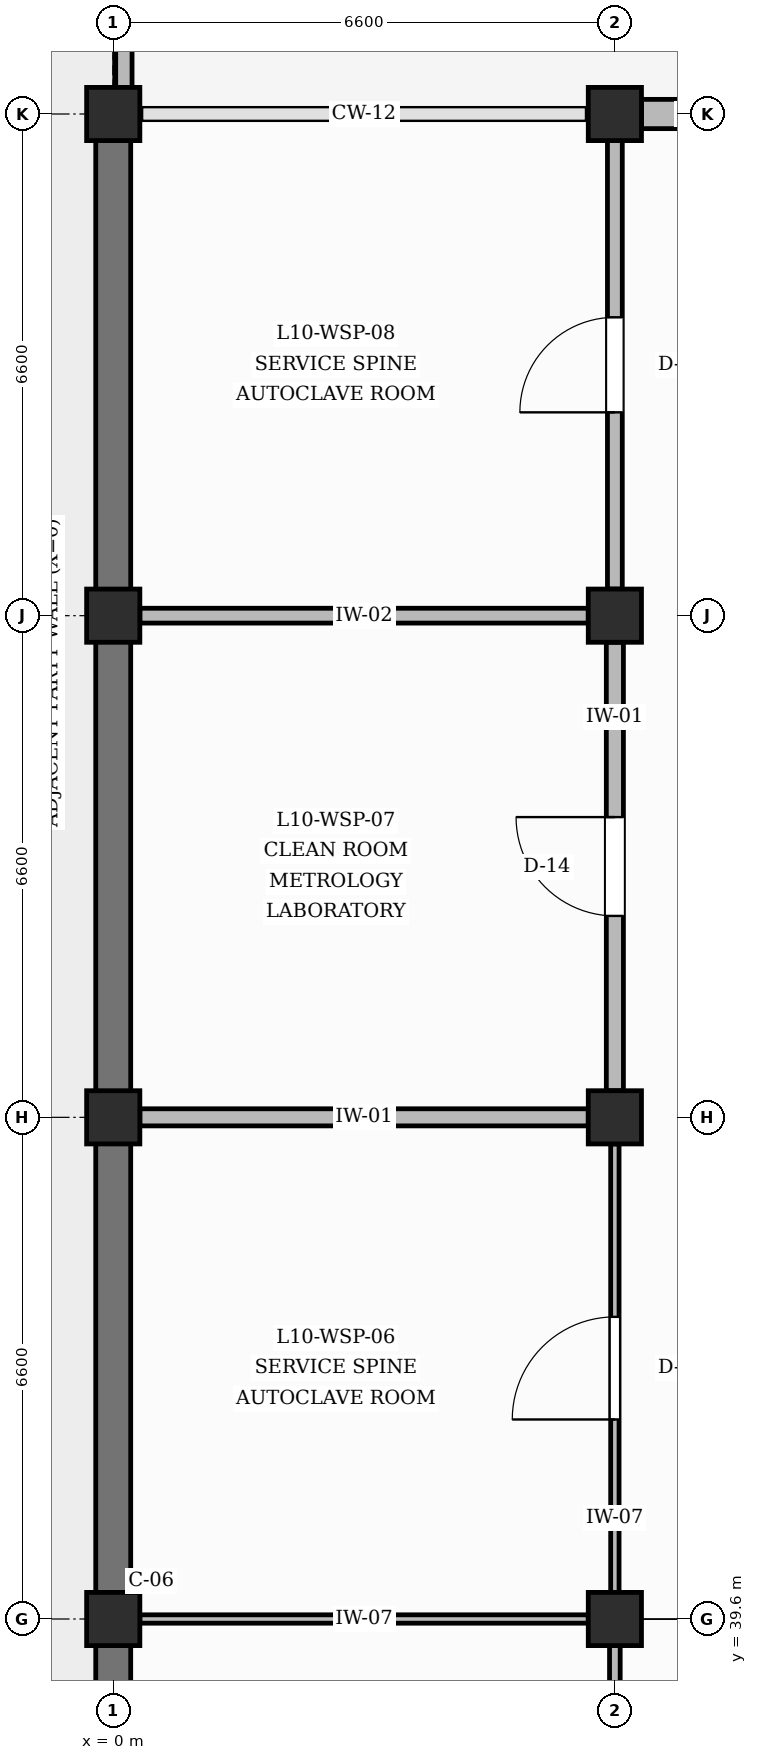
"""IFC4 building model, lengths in metres.
Left out: names, types, materials, properties, quantities, classifications, styles, units other than length and angle.
Written with IfcOpenShell. Run it as: python <this file> out.ifc"""

import sys

from ifc_helpers import new_model, si_unit, direction, frame, frame_2d, origin, origin_2d, place, context, subcontext, project, spatial, rectangle, extrude, element, fill, save


model = new_model("IFC4")
c1 = context("Model", 3, precision=1e-05, world=origin(), true_north=direction((0.0, 1.0)))
c2 = subcontext(c1, "Body", "Model", "MODEL_VIEW")
j1 = project(units=[si_unit("LENGTHUNIT", "METRE"), si_unit("PLANEANGLEUNIT", "RADIAN")], contexts=[c1])
p1 = place(None, origin())
s1 = spatial("IfcSite", under=j1, at=p1, CompositionType="ELEMENT")
p2 = place(p1, origin())
s2 = spatial("IfcBuilding", under=s1, at=p2, CompositionType="ELEMENT")
p3 = place(p2, frame((0.0, 0.0, 43.8)))
s3 = spatial("IfcBuildingStorey", under=s2, at=p3, CompositionType="ELEMENT", Elevation=43.8)
for number, where, z_axis, x_axis in (
    (1, (0.0, 39.6, 0.0), (0.0, 0.0, 1.0), (1.0, 0.0, 0.0)),
    (2, (0.0, 46.2, 0.0), (0.0, 0.0, 1.0), (1.0, 0.0, 0.0)),
    (3, (0.0, 52.8, 0.0), (0.0, 0.0, 1.0), (1.0, 0.0, 0.0)),
    (4, (0.0, 59.4, 0.0), (0.0, 0.0, 1.0), (1.0, 0.0, 0.0)),
    (5, (6.6, 39.6, 0.0), (0.0, 0.0, 1.0), (1.0, 0.0, 0.0)),
    (6, (6.6, 46.2, 0.0), (0.0, 0.0, 1.0), (1.0, 0.0, 0.0)),
    (7, (6.6, 52.8, 0.0), (0.0, 0.0, 1.0), (1.0, 0.0, 0.0)),
    (8, (6.6, 59.4, 0.0), (0.0, 0.0, 1.0), (1.0, 0.0, 0.0)),
):
    element("IfcColumn", number, at=place(p3, frame(where, z_axis=z_axis, x_axis=x_axis)), inside=s3, PredefinedType="COLUMN", context=c2, shape_type="SweptSolid", body=[
        extrude(rectangle(XDim=0.7, YDim=0.7, at=origin_2d()), origin(), (0.0, 0.0, 1.0), 4.2),
    ])
p4 = place(p3, frame((0.0, 33.35, 0.0), z_axis=(0.0, 0.0, 1.0), x_axis=(0.0, 1.0, 0.0)))
e9 = element("IfcWall", 9, at=p4, inside=s3, PredefinedType="SOLIDWALL", context=c2, shape_type="SweptSolid", body=[
    extrude(rectangle(XDim=5.9, YDim=0.46, at=frame_2d((2.95, 0.0))), origin(), (0.0, 0.0, 1.0), 3.29),
])
p5 = place(p3, frame((0.0, 39.95, 0.0), z_axis=(0.0, 0.0, 1.0), x_axis=(0.0, 1.0, 0.0)))
e10 = element("IfcWall", 10, at=p5, inside=s3, PredefinedType="SOLIDWALL", context=c2, shape_type="SweptSolid", body=[
    extrude(rectangle(XDim=5.9, YDim=0.46, at=frame_2d((2.95, 0.0))), origin(), (0.0, 0.0, 1.0), 3.29),
])
p6 = place(p3, frame((0.0, 46.55, 0.0), z_axis=(0.0, 0.0, 1.0), x_axis=(0.0, 1.0, 0.0)))
e11 = element("IfcWall", 11, at=p6, inside=s3, PredefinedType="SOLIDWALL", context=c2, shape_type="SweptSolid", body=[
    extrude(rectangle(XDim=5.9, YDim=0.46, at=frame_2d((2.95, 0.0))), origin(), (0.0, 0.0, 1.0), 3.29),
])
p7 = place(p3, frame((0.0, 53.15, 0.0), z_axis=(0.0, 0.0, 1.0), x_axis=(0.0, 1.0, 0.0)))
e12 = element("IfcWall", 12, at=p7, inside=s3, PredefinedType="SOLIDWALL", context=c2, shape_type="SweptSolid", body=[
    extrude(rectangle(XDim=5.9, YDim=0.46, at=frame_2d((2.95, 0.0))), origin(), (0.0, 0.0, 1.0), 3.29),
])
p8 = place(p3, frame((6.95, 59.4, 0.0), z_axis=(0.0, 0.0, 1.0), x_axis=(1.0, 0.0, 0.0)))
e13 = element("IfcWall", 13, at=p8, inside=s3, PredefinedType="SOLIDWALL", context=c2, shape_type="SweptSolid", body=[
    extrude(rectangle(XDim=5.9, YDim=0.385, at=frame_2d((2.95, 0.0))), origin(), (0.0, 0.0, 1.0), 3.29),
])
p9 = place(p8, frame((2.19, 0.0, 0.95)))
e14 = element("IfcOpeningElement", 14, at=p9, cuts=e13, PredefinedType="OPENING", context=c2, shape_type="SweptSolid", body=[
    extrude(rectangle(XDim=1.52, YDim=1.96, at=frame_2d((0.76, 0.98))), frame((0.0, 0.202, 0.0), z_axis=(0.0, -1.0, 0.0), x_axis=(1.0, 0.0, 0.0)), (0.0, 0.0, 1.0), 0.405),
])
p10 = place(p3, frame((0.14, 59.7, 0.0), z_axis=(0.0, 0.0, 1.0), x_axis=(0.0, 1.0, 0.0)))
e15 = element("IfcWall", 15, at=p10, inside=s3, PredefinedType="PARAPET", context=c2, shape_type="SweptSolid", body=[
    extrude(rectangle(XDim=6.0, YDim=0.215, at=frame_2d((3.0, 0.0))), origin(), (0.0, 0.0, 1.0), 1.15),
])
p11 = place(p3, frame((6.6, 33.35, 0.0), z_axis=(0.0, 0.0, 1.0), x_axis=(0.0, 1.0, 0.0)))
e16 = element("IfcWall", 16, at=p11, inside=s3, PredefinedType="PARTITIONING", context=c2, shape_type="SweptSolid", body=[
    extrude(rectangle(XDim=5.9, YDim=0.14, at=frame_2d((2.95, 0.0))), origin(), (0.0, 0.0, 1.0), 3.29),
])
p12 = place(p11, frame((2.25, 0.0, 0.0)))
e17 = element("IfcOpeningElement", 17, at=p12, cuts=e16, PredefinedType="OPENING", context=c2, shape_type="SweptSolid", body=[
    extrude(rectangle(XDim=1.4, YDim=2.25, at=frame_2d((0.7, 1.125))), frame((0.0, 0.08, 0.0), z_axis=(0.0, -1.0, 0.0), x_axis=(1.0, 0.0, 0.0)), (0.0, 0.0, 1.0), 0.16),
])
p13 = place(p3, frame((0.35, 39.6, 0.0), z_axis=(0.0, 0.0, 1.0), x_axis=(1.0, 0.0, 0.0)))
e18 = element("IfcWall", 18, at=p13, inside=s3, PredefinedType="PARTITIONING", context=c2, shape_type="SweptSolid", body=[
    extrude(rectangle(XDim=5.9, YDim=0.11, at=frame_2d((2.95, 0.0))), origin(), (0.0, 0.0, 1.0), 3.29),
])
p14 = place(p3, frame((6.6, 39.95, 0.0), z_axis=(0.0, 0.0, 1.0), x_axis=(0.0, 1.0, 0.0)))
e19 = element("IfcWall", 19, at=p14, inside=s3, PredefinedType="PARTITIONING", context=c2, shape_type="SweptSolid", body=[
    extrude(rectangle(XDim=5.9, YDim=0.11, at=frame_2d((2.95, 0.0))), origin(), (0.0, 0.0, 1.0), 3.29),
])
p15 = place(p14, frame((2.275, 0.0, 0.0)))
e20 = element("IfcOpeningElement", 20, at=p15, cuts=e19, PredefinedType="OPENING", context=c2, shape_type="SweptSolid", body=[
    extrude(rectangle(XDim=1.35, YDim=2.3, at=frame_2d((0.675, 1.15))), frame((0.0, 0.065, 0.0), z_axis=(0.0, -1.0, 0.0), x_axis=(1.0, 0.0, 0.0)), (0.0, 0.0, 1.0), 0.13),
])
p16 = place(p3, frame((0.35, 46.2, 0.0), z_axis=(0.0, 0.0, 1.0), x_axis=(1.0, 0.0, 0.0)))
e21 = element("IfcWall", 21, at=p16, inside=s3, PredefinedType="PARTITIONING", context=c2, shape_type="SweptSolid", body=[
    extrude(rectangle(XDim=5.9, YDim=0.225, at=frame_2d((2.95, 0.0))), origin(), (0.0, 0.0, 1.0), 3.29),
])
p17 = place(p3, frame((6.6, 46.55, 0.0), z_axis=(0.0, 0.0, 1.0), x_axis=(0.0, 1.0, 0.0)))
e22 = element("IfcWall", 22, at=p17, inside=s3, PredefinedType="PARTITIONING", context=c2, shape_type="SweptSolid", body=[
    extrude(rectangle(XDim=5.9, YDim=0.225, at=frame_2d((2.95, 0.0))), origin(), (0.0, 0.0, 1.0), 3.29),
])
p18 = place(p17, frame((2.3, 0.0, 0.0)))
e23 = element("IfcOpeningElement", 23, at=p18, cuts=e22, PredefinedType="OPENING", context=c2, shape_type="SweptSolid", body=[
    extrude(rectangle(XDim=1.3, YDim=2.3, at=frame_2d((0.65, 1.15))), frame((0.0, 0.123, 0.0), z_axis=(0.0, -1.0, 0.0), x_axis=(1.0, 0.0, 0.0)), (0.0, 0.0, 1.0), 0.245),
])
p19 = place(p3, frame((0.35, 52.8, 0.0), z_axis=(0.0, 0.0, 1.0), x_axis=(1.0, 0.0, 0.0)))
e24 = element("IfcWall", 24, at=p19, inside=s3, PredefinedType="PARTITIONING", context=c2, shape_type="SweptSolid", body=[
    extrude(rectangle(XDim=5.9, YDim=0.195, at=frame_2d((2.95, 0.0))), origin(), (0.0, 0.0, 1.0), 3.29),
])
p20 = place(p3, frame((6.6, 53.15, 0.0), z_axis=(0.0, 0.0, 1.0), x_axis=(0.0, 1.0, 0.0)))
e25 = element("IfcWall", 25, at=p20, inside=s3, PredefinedType="PARTITIONING", context=c2, shape_type="SweptSolid", body=[
    extrude(rectangle(XDim=5.9, YDim=0.195, at=frame_2d((2.95, 0.0))), origin(), (0.0, 0.0, 1.0), 3.29),
])
p21 = place(p20, frame((2.325, 0.0, 0.0)))
e26 = element("IfcOpeningElement", 26, at=p21, cuts=e25, PredefinedType="OPENING", context=c2, shape_type="SweptSolid", body=[
    extrude(rectangle(XDim=1.25, YDim=2.25, at=frame_2d((0.625, 1.125))), frame((0.0, 0.107, 0.0), z_axis=(0.0, -1.0, 0.0), x_axis=(1.0, 0.0, 0.0)), (0.0, 0.0, 1.0), 0.215),
])
p22 = place(p15, origin())
e27 = element("IfcDoor", 27, at=p22, inside=s3, OperationType="SINGLE_SWING_LEFT", PredefinedType="DOOR", context=c2, shape_type="SweptSolid", body=[
    extrude(rectangle(XDim=1.35, YDim=2.3, at=frame_2d((0.675, 1.15))), frame((0.0, 0.025, 0.0), z_axis=(0.0, -1.0, 0.0), x_axis=(1.0, 0.0, 0.0)), (0.0, 0.0, 1.0), 0.05),
])
fill(e20, e27)
p23 = place(p18, origin())
e28 = element("IfcDoor", 28, at=p23, inside=s3, OperationType="SINGLE_SWING_RIGHT", PredefinedType="DOOR", context=c2, shape_type="SweptSolid", body=[
    extrude(rectangle(XDim=1.3, YDim=2.3, at=frame_2d((0.65, 1.15))), frame((0.0, 0.025, 0.0), z_axis=(0.0, -1.0, 0.0), x_axis=(1.0, 0.0, 0.0)), (0.0, 0.0, 1.0), 0.05),
])
fill(e23, e28)
p24 = place(p21, origin())
e29 = element("IfcDoor", 29, at=p24, inside=s3, OperationType="SINGLE_SWING_LEFT", PredefinedType="DOOR", context=c2, shape_type="SweptSolid", body=[
    extrude(rectangle(XDim=1.25, YDim=2.25, at=frame_2d((0.625, 1.125))), frame((0.0, 0.025, 0.0), z_axis=(0.0, -1.0, 0.0), x_axis=(1.0, 0.0, 0.0)), (0.0, 0.0, 1.0), 0.05),
])
fill(e26, e29)
save(model, sys.argv[1])
